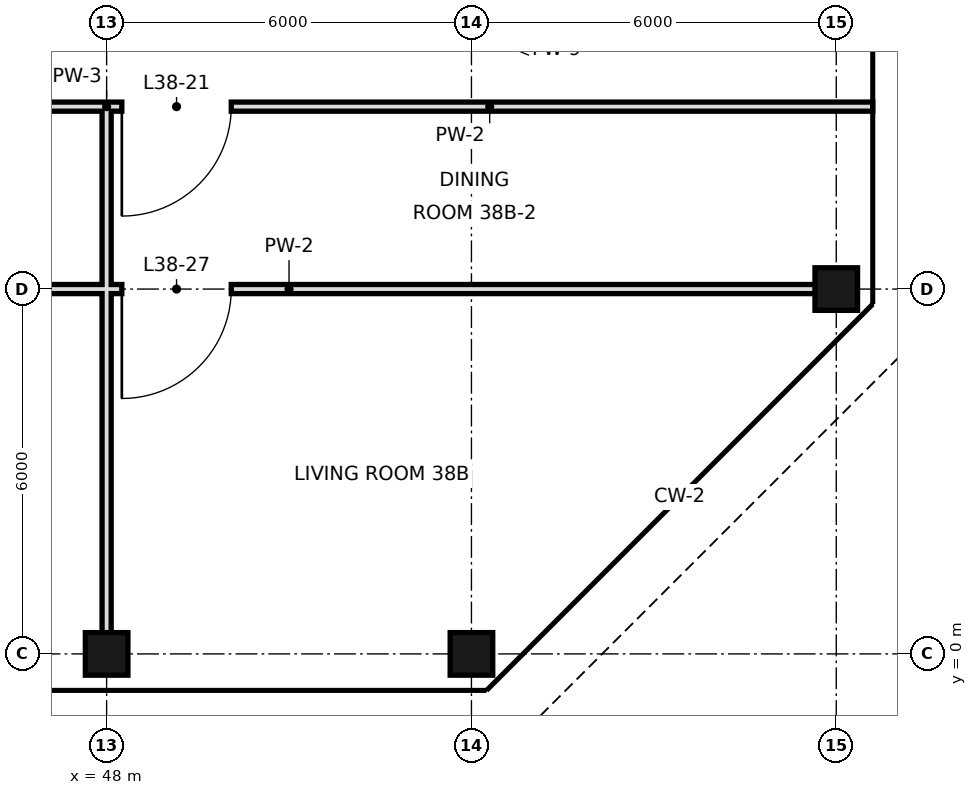
"""IFC4 building model, lengths in metres.
Left out: names, types, materials, properties, quantities, classifications, styles, units other than length and angle.
Written with IfcOpenShell. Run it as: python <this file> out.ifc"""

import sys

from ifc_helpers import new_model, si_unit, direction, frame, frame_2d, origin, origin_2d, place, context, subcontext, project, spatial, rectangle, hollow_rectangle, extrude, element, fill, save


model = new_model("IFC4")
c1 = context("Model", 3, precision=1e-05, world=origin(), true_north=direction((0.0, 1.0)))
c2 = subcontext(c1, "Body", "Model", "MODEL_VIEW")
j1 = project(units=[si_unit("LENGTHUNIT", "METRE"), si_unit("PLANEANGLEUNIT", "RADIAN")], contexts=[c1])
p1 = place(None, origin())
s1 = spatial("IfcSite", under=j1, at=p1, CompositionType="ELEMENT")
p2 = place(p1, origin())
s2 = spatial("IfcBuilding", under=s1, at=p2, CompositionType="ELEMENT")
p3 = place(p2, frame((0.0, 0.0, 167.2)))
s3 = spatial("IfcBuildingStorey", under=s2, at=p3, CompositionType="ELEMENT", Elevation=167.2)
for number, where, z_axis, x_axis in (
    (1, (48.0, 0.0, 0.0), (0.0, 0.0, 1.0), (1.0, 0.0, 0.0)),
    (2, (54.0, 0.0, 0.0), (0.0, 0.0, 1.0), (1.0, 0.0, 0.0)),
    (3, (60.0, 6.0, 0.0), (0.0, 0.0, 1.0), (1.0, 0.0, 0.0)),
):
    element("IfcColumn", number, at=place(p3, frame(where, z_axis=z_axis, x_axis=x_axis)), inside=s3, PredefinedType="COLUMN", context=c2, shape_type="SweptSolid", body=[
        extrude(hollow_rectangle(XDim=0.7, YDim=0.7, WallThickness=0.036, at=origin_2d()), origin(), (0.0, 0.0, 1.0), 3.6),
    ])
p4 = place(p3, frame((48.0, 0.0, 0.0), z_axis=(0.0, 0.0, 1.0), x_axis=(0.0, 1.0, 0.0)))
e4 = element("IfcWall", 4, at=p4, inside=s3, PredefinedType="PARTITIONING", context=c2, shape_type="SweptSolid", body=[
    extrude(rectangle(XDim=6.0, YDim=0.15, at=frame_2d((3.0, 0.0))), origin(), (0.0, 0.0, 1.0), 2.72),
])
p5 = place(p3, frame((48.0, 6.0, 0.0), z_axis=(0.0, 0.0, 1.0), x_axis=(0.0, 1.0, 0.0)))
e5 = element("IfcWall", 5, at=p5, inside=s3, PredefinedType="PARTITIONING", context=c2, shape_type="SweptSolid", body=[
    extrude(rectangle(XDim=3.0, YDim=0.15, at=frame_2d((1.5, 0.0))), origin(), (0.0, 0.0, 1.0), 2.72),
])
p6 = place(p3, frame((48.0, 6.0, 0.0), z_axis=(0.0, 0.0, 1.0), x_axis=(1.0, 0.0, 0.0)))
e6 = element("IfcWall", 6, at=p6, inside=s3, PredefinedType="PARTITIONING", context=c2, shape_type="SweptSolid", body=[
    extrude(rectangle(XDim=12.0, YDim=0.15, at=frame_2d((6.0, 0.0))), origin(), (0.0, 0.0, 1.0), 2.72),
])
p7 = place(p6, frame((0.25, 0.0, 0.0)))
e7 = element("IfcOpeningElement", 7, at=p7, cuts=e6, PredefinedType="OPENING", context=c2, shape_type="SweptSolid", body=[
    extrude(rectangle(XDim=1.8, YDim=2.4, at=frame_2d((0.9, 1.2))), frame((0.0, 0.085, 0.0), z_axis=(0.0, -1.0, 0.0), x_axis=(1.0, 0.0, 0.0)), (0.0, 0.0, 1.0), 0.17),
])
p8 = place(p3, frame((39.6, 6.0, 0.0), z_axis=(0.0, 0.0, 1.0), x_axis=(1.0, 0.0, 0.0)))
e8 = element("IfcWall", 8, at=p8, inside=s3, PredefinedType="PARTITIONING", context=c2, shape_type="SweptSolid", body=[
    extrude(rectangle(XDim=8.4, YDim=0.15, at=frame_2d((4.2, 0.0))), origin(), (0.0, 0.0, 1.0), 2.97),
])
p9 = place(p8, frame((0.75, 0.0, 0.0)))
e9 = element("IfcOpeningElement", 9, at=p9, cuts=e8, PredefinedType="OPENING", context=c2, shape_type="SweptSolid", body=[
    extrude(rectangle(XDim=0.9, YDim=2.4, at=frame_2d((0.45, 1.2))), frame((0.0, 0.085, 0.0), z_axis=(0.0, -1.0, 0.0), x_axis=(1.0, 0.0, 0.0)), (0.0, 0.0, 1.0), 0.17),
])
p10 = place(p3, frame((48.0, 9.0, 0.0), z_axis=(0.0, 0.0, 1.0), x_axis=(1.0, 0.0, 0.0)))
e10 = element("IfcWall", 10, at=p10, inside=s3, PredefinedType="PARTITIONING", context=c2, shape_type="SweptSolid", body=[
    extrude(rectangle(XDim=12.6, YDim=0.15, at=frame_2d((6.3, 0.0))), origin(), (0.0, 0.0, 1.0), 3.42),
])
p11 = place(p10, frame((0.25, 0.0, 0.0)))
e11 = element("IfcOpeningElement", 11, at=p11, cuts=e10, PredefinedType="OPENING", context=c2, shape_type="SweptSolid", body=[
    extrude(rectangle(XDim=1.8, YDim=2.4, at=frame_2d((0.9, 1.2))), frame((0.0, 0.085, 0.0), z_axis=(0.0, -1.0, 0.0), x_axis=(1.0, 0.0, 0.0)), (0.0, 0.0, 1.0), 0.17),
])
p12 = place(p3, frame((39.6, 9.0, 0.0), z_axis=(0.0, 0.0, 1.0), x_axis=(1.0, 0.0, 0.0)))
e12 = element("IfcWall", 12, at=p12, inside=s3, PredefinedType="PARTITIONING", context=c2, shape_type="SweptSolid", body=[
    extrude(rectangle(XDim=8.4, YDim=0.15, at=frame_2d((4.2, 0.0))), origin(), (0.0, 0.0, 1.0), 3.42),
])
p13 = place(p11, frame((1.8, 0.0, 0.0), z_axis=(0.0, 0.0, 1.0), x_axis=(-1.0, 0.0, 0.0)))
e13 = element("IfcDoor", 13, at=p13, inside=s3, OperationType="SINGLE_SWING_RIGHT", PredefinedType="DOOR", context=c2, shape_type="SweptSolid", body=[
    extrude(rectangle(XDim=1.8, YDim=2.4, at=frame_2d((0.9, 1.2))), frame((0.0, 0.025, 0.0), z_axis=(0.0, -1.0, 0.0), x_axis=(1.0, 0.0, 0.0)), (0.0, 0.0, 1.0), 0.05),
])
fill(e11, e13)
p14 = place(p7, frame((1.8, 0.0, 0.0), z_axis=(0.0, 0.0, 1.0), x_axis=(-1.0, 0.0, 0.0)))
e14 = element("IfcDoor", 14, at=p14, inside=s3, OperationType="SINGLE_SWING_RIGHT", PredefinedType="DOOR", context=c2, shape_type="SweptSolid", body=[
    extrude(rectangle(XDim=1.8, YDim=2.4, at=frame_2d((0.9, 1.2))), frame((0.0, 0.025, 0.0), z_axis=(0.0, -1.0, 0.0), x_axis=(1.0, 0.0, 0.0)), (0.0, 0.0, 1.0), 0.05),
])
fill(e7, e14)
save(model, sys.argv[1])
